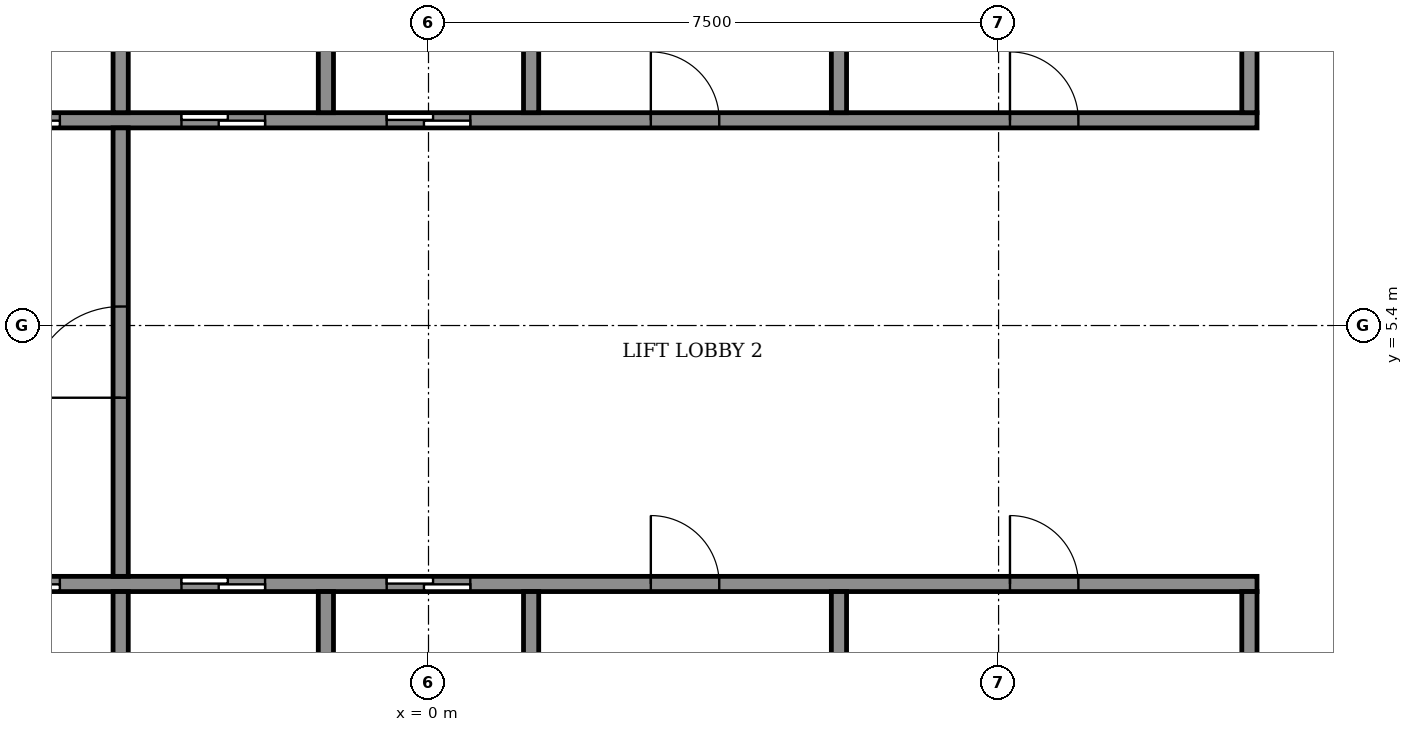
"""IFC4 building model, lengths in metres.
Left out: names, types, materials, properties, quantities, classifications, styles, units other than length and angle.
Written with IfcOpenShell. Run it as: python <this file> out.ifc"""

import sys

from ifc_helpers import new_model, si_unit, direction, frame, frame_2d, origin, place, context, subcontext, project, spatial, rectangle, extrude, element, fill, save


model = new_model("IFC4")
c1 = context("Model", 3, precision=1e-05, world=origin(), true_north=direction((0.0, 1.0)))
c2 = subcontext(c1, "Body", "Model", "MODEL_VIEW")
j1 = project(units=[si_unit("LENGTHUNIT", "METRE"), si_unit("PLANEANGLEUNIT", "RADIAN")], contexts=[c1])
p1 = place(None, origin())
s1 = spatial("IfcSite", under=j1, at=p1, CompositionType="ELEMENT")
p2 = place(p1, origin())
s2 = spatial("IfcBuilding", under=s1, at=p2, CompositionType="ELEMENT")
p3 = place(p2, frame((0.0, 0.0, 271.7)))
s3 = spatial("IfcBuildingStorey", under=s2, at=p3, CompositionType="ELEMENT", Elevation=271.7)
p4 = place(p3, frame((-10.9, 2.0, 0.0), z_axis=(0.0, 0.0, 1.0), x_axis=(1.0, 0.0, 0.0)))
e1 = element("IfcWall", 1, at=p4, inside=s3, PredefinedType="SHEAR", context=c2, shape_type="SweptSolid", body=[
    extrude(rectangle(XDim=21.8, YDim=0.2, at=frame_2d((10.9, 0.0))), origin(), (0.0, 0.0, 1.0), 3.05),
])
p5 = place(p4, frame((4.95, 0.0, 0.0)))
e2 = element("IfcOpeningElement", 2, at=p5, cuts=e1, PredefinedType="OPENING", context=c2, shape_type="SweptSolid", body=[
    extrude(rectangle(XDim=1.1, YDim=2.1, at=frame_2d((0.55, 1.05))), frame((0.0, 0.11, 0.0), z_axis=(0.0, -1.0, 0.0), x_axis=(1.0, 0.0, 0.0)), (0.0, 0.0, 1.0), 0.22),
])
p6 = place(p4, frame((7.65, 0.0, 0.0)))
e3 = element("IfcOpeningElement", 3, at=p6, cuts=e1, PredefinedType="OPENING", context=c2, shape_type="SweptSolid", body=[
    extrude(rectangle(XDim=1.1, YDim=2.1, at=frame_2d((0.55, 1.05))), frame((0.0, 0.11, 0.0), z_axis=(0.0, -1.0, 0.0), x_axis=(1.0, 0.0, 0.0)), (0.0, 0.0, 1.0), 0.22),
])
p7 = place(p4, frame((10.35, 0.0, 0.0)))
e4 = element("IfcOpeningElement", 4, at=p7, cuts=e1, PredefinedType="OPENING", context=c2, shape_type="SweptSolid", body=[
    extrude(rectangle(XDim=1.1, YDim=2.1, at=frame_2d((0.55, 1.05))), frame((0.0, 0.11, 0.0), z_axis=(0.0, -1.0, 0.0), x_axis=(1.0, 0.0, 0.0)), (0.0, 0.0, 1.0), 0.22),
])
p8 = place(p4, frame((1.675, 0.0, 0.0)))
e5 = element("IfcOpeningElement", 5, at=p8, cuts=e1, PredefinedType="OPENING", context=c2, shape_type="SweptSolid", body=[
    extrude(rectangle(XDim=0.9, YDim=2.1, at=frame_2d((0.45, 1.05))), frame((0.0, 0.11, 0.0), z_axis=(0.0, -1.0, 0.0), x_axis=(1.0, 0.0, 0.0)), (0.0, 0.0, 1.0), 0.22),
])
p9 = place(p4, frame((13.825, 0.0, 0.0)))
e6 = element("IfcOpeningElement", 6, at=p9, cuts=e1, PredefinedType="OPENING", context=c2, shape_type="SweptSolid", body=[
    extrude(rectangle(XDim=0.9, YDim=2.1, at=frame_2d((0.45, 1.05))), frame((0.0, 0.11, 0.0), z_axis=(0.0, -1.0, 0.0), x_axis=(1.0, 0.0, 0.0)), (0.0, 0.0, 1.0), 0.22),
])
p10 = place(p4, frame((18.55, 0.0, 0.0)))
e7 = element("IfcOpeningElement", 7, at=p10, cuts=e1, PredefinedType="OPENING", context=c2, shape_type="SweptSolid", body=[
    extrude(rectangle(XDim=0.9, YDim=2.1, at=frame_2d((0.45, 1.05))), frame((0.0, 0.11, 0.0), z_axis=(0.0, -1.0, 0.0), x_axis=(1.0, 0.0, 0.0)), (0.0, 0.0, 1.0), 0.22),
])
p11 = place(p3, frame((-10.9, 8.1, 0.0), z_axis=(0.0, 0.0, 1.0), x_axis=(1.0, 0.0, 0.0)))
e8 = element("IfcWall", 8, at=p11, inside=s3, PredefinedType="SHEAR", context=c2, shape_type="SweptSolid", body=[
    extrude(rectangle(XDim=21.8, YDim=0.2, at=frame_2d((10.9, 0.0))), origin(), (0.0, 0.0, 1.0), 3.05),
])
p12 = place(p11, frame((4.95, 0.0, 0.0)))
e9 = element("IfcOpeningElement", 9, at=p12, cuts=e8, PredefinedType="OPENING", context=c2, shape_type="SweptSolid", body=[
    extrude(rectangle(XDim=1.1, YDim=2.1, at=frame_2d((0.55, 1.05))), frame((0.0, 0.11, 0.0), z_axis=(0.0, -1.0, 0.0), x_axis=(1.0, 0.0, 0.0)), (0.0, 0.0, 1.0), 0.22),
])
p13 = place(p11, frame((7.65, 0.0, 0.0)))
e10 = element("IfcOpeningElement", 10, at=p13, cuts=e8, PredefinedType="OPENING", context=c2, shape_type="SweptSolid", body=[
    extrude(rectangle(XDim=1.1, YDim=2.1, at=frame_2d((0.55, 1.05))), frame((0.0, 0.11, 0.0), z_axis=(0.0, -1.0, 0.0), x_axis=(1.0, 0.0, 0.0)), (0.0, 0.0, 1.0), 0.22),
])
p14 = place(p11, frame((10.35, 0.0, 0.0)))
e11 = element("IfcOpeningElement", 11, at=p14, cuts=e8, PredefinedType="OPENING", context=c2, shape_type="SweptSolid", body=[
    extrude(rectangle(XDim=1.1, YDim=2.1, at=frame_2d((0.55, 1.05))), frame((0.0, 0.11, 0.0), z_axis=(0.0, -1.0, 0.0), x_axis=(1.0, 0.0, 0.0)), (0.0, 0.0, 1.0), 0.22),
])
p15 = place(p11, frame((1.675, 0.0, 0.0)))
e12 = element("IfcOpeningElement", 12, at=p15, cuts=e8, PredefinedType="OPENING", context=c2, shape_type="SweptSolid", body=[
    extrude(rectangle(XDim=0.9, YDim=2.1, at=frame_2d((0.45, 1.05))), frame((0.0, 0.11, 0.0), z_axis=(0.0, -1.0, 0.0), x_axis=(1.0, 0.0, 0.0)), (0.0, 0.0, 1.0), 0.22),
])
p16 = place(p11, frame((13.825, 0.0, 0.0)))
e13 = element("IfcOpeningElement", 13, at=p16, cuts=e8, PredefinedType="OPENING", context=c2, shape_type="SweptSolid", body=[
    extrude(rectangle(XDim=0.9, YDim=2.1, at=frame_2d((0.45, 1.05))), frame((0.0, 0.11, 0.0), z_axis=(0.0, -1.0, 0.0), x_axis=(1.0, 0.0, 0.0)), (0.0, 0.0, 1.0), 0.22),
])
p17 = place(p11, frame((18.55, 0.0, 0.0)))
e14 = element("IfcOpeningElement", 14, at=p17, cuts=e8, PredefinedType="OPENING", context=c2, shape_type="SweptSolid", body=[
    extrude(rectangle(XDim=0.9, YDim=2.1, at=frame_2d((0.45, 1.05))), frame((0.0, 0.11, 0.0), z_axis=(0.0, -1.0, 0.0), x_axis=(1.0, 0.0, 0.0)), (0.0, 0.0, 1.0), 0.22),
])
for number, where, z_axis, x_axis in (
    (15, (-4.05, -0.6, 0.0), (0.0, 0.0, 1.0), (0.0, 1.0, 0.0)),
    (16, (-1.35, -0.6, 0.0), (0.0, 0.0, 1.0), (0.0, 1.0, 0.0)),
    (17, (1.35, -0.6, 0.0), (0.0, 0.0, 1.0), (0.0, 1.0, 0.0)),
):
    element("IfcWall", number, at=place(p3, frame(where, z_axis=z_axis, x_axis=x_axis)), inside=s3, PredefinedType="SHEAR", context=c2, shape_type="SweptSolid", body=[
        extrude(rectangle(XDim=2.5, YDim=0.2, at=frame_2d((1.25, 0.0))), origin(), (0.0, 0.0, 1.0), 3.05),
    ])
for number, where, z_axis, x_axis in (
    (18, (5.4, -0.6, 0.0), (0.0, 0.0, 1.0), (0.0, 1.0, 0.0)),
    (19, (10.8, -0.6, 0.0), (0.0, 0.0, 1.0), (0.0, 1.0, 0.0)),
):
    element("IfcWall", number, at=place(p3, frame(where, z_axis=z_axis, x_axis=x_axis)), inside=s3, PredefinedType="STANDARD", context=c2, shape_type="SweptSolid", body=[
        extrude(rectangle(XDim=2.5, YDim=0.2, at=frame_2d((1.25, 0.0))), origin(), (0.0, 0.0, 1.0), 3.05),
    ])
for number, where, z_axis, x_axis in (
    (20, (-4.05, 8.2, 0.0), (0.0, 0.0, 1.0), (0.0, 1.0, 0.0)),
    (21, (-1.35, 8.2, 0.0), (0.0, 0.0, 1.0), (0.0, 1.0, 0.0)),
    (22, (1.35, 8.2, 0.0), (0.0, 0.0, 1.0), (0.0, 1.0, 0.0)),
):
    element("IfcWall", number, at=place(p3, frame(where, z_axis=z_axis, x_axis=x_axis)), inside=s3, PredefinedType="SHEAR", context=c2, shape_type="SweptSolid", body=[
        extrude(rectangle(XDim=2.6, YDim=0.2, at=frame_2d((1.3, 0.0))), origin(), (0.0, 0.0, 1.0), 3.05),
    ])
for number, where, z_axis, x_axis in (
    (23, (5.4, 8.2, 0.0), (0.0, 0.0, 1.0), (0.0, 1.0, 0.0)),
    (24, (10.8, 8.2, 0.0), (0.0, 0.0, 1.0), (0.0, 1.0, 0.0)),
):
    element("IfcWall", number, at=place(p3, frame(where, z_axis=z_axis, x_axis=x_axis)), inside=s3, PredefinedType="STANDARD", context=c2, shape_type="SweptSolid", body=[
        extrude(rectangle(XDim=2.6, YDim=0.2, at=frame_2d((1.3, 0.0))), origin(), (0.0, 0.0, 1.0), 3.05),
    ])
p18 = place(p3, frame((-4.05, 2.1, 0.0), z_axis=(0.0, 0.0, 1.0), x_axis=(0.0, 1.0, 0.0)))
e25 = element("IfcWall", 25, at=p18, inside=s3, PredefinedType="STANDARD", context=c2, shape_type="SweptSolid", body=[
    extrude(rectangle(XDim=5.9, YDim=0.2, at=frame_2d((2.95, 0.0))), origin(), (0.0, 0.0, 1.0), 3.05),
])
p19 = place(p18, frame((2.35, 0.0, 0.0)))
e26 = element("IfcOpeningElement", 26, at=p19, cuts=e25, PredefinedType="OPENING", context=c2, shape_type="SweptSolid", body=[
    extrude(rectangle(XDim=1.2, YDim=2.1, at=frame_2d((0.6, 1.05))), frame((0.0, 0.11, 0.0), z_axis=(0.0, -1.0, 0.0), x_axis=(1.0, 0.0, 0.0)), (0.0, 0.0, 1.0), 0.22),
])
p20 = place(p5, origin())
e27 = element("IfcDoor", 27, at=p20, inside=s3, OperationType="SLIDING_TO_LEFT", PredefinedType="DOOR", context=c2, shape_type="SweptSolid", body=[
    extrude(rectangle(XDim=1.1, YDim=2.1, at=frame_2d((0.55, 1.05))), frame((0.0, 0.025, 0.0), z_axis=(0.0, -1.0, 0.0), x_axis=(1.0, 0.0, 0.0)), (0.0, 0.0, 1.0), 0.05),
])
fill(e2, e27)
p21 = place(p6, origin())
e28 = element("IfcDoor", 28, at=p21, inside=s3, OperationType="SLIDING_TO_LEFT", PredefinedType="DOOR", context=c2, shape_type="SweptSolid", body=[
    extrude(rectangle(XDim=1.1, YDim=2.1, at=frame_2d((0.55, 1.05))), frame((0.0, 0.025, 0.0), z_axis=(0.0, -1.0, 0.0), x_axis=(1.0, 0.0, 0.0)), (0.0, 0.0, 1.0), 0.05),
])
fill(e3, e28)
p22 = place(p7, origin())
e29 = element("IfcDoor", 29, at=p22, inside=s3, OperationType="SLIDING_TO_LEFT", PredefinedType="DOOR", context=c2, shape_type="SweptSolid", body=[
    extrude(rectangle(XDim=1.1, YDim=2.1, at=frame_2d((0.55, 1.05))), frame((0.0, 0.025, 0.0), z_axis=(0.0, -1.0, 0.0), x_axis=(1.0, 0.0, 0.0)), (0.0, 0.0, 1.0), 0.05),
])
fill(e4, e29)
p23 = place(p12, origin())
e30 = element("IfcDoor", 30, at=p23, inside=s3, OperationType="SLIDING_TO_LEFT", PredefinedType="DOOR", context=c2, shape_type="SweptSolid", body=[
    extrude(rectangle(XDim=1.1, YDim=2.1, at=frame_2d((0.55, 1.05))), frame((0.0, 0.025, 0.0), z_axis=(0.0, -1.0, 0.0), x_axis=(1.0, 0.0, 0.0)), (0.0, 0.0, 1.0), 0.05),
])
fill(e9, e30)
p24 = place(p13, origin())
e31 = element("IfcDoor", 31, at=p24, inside=s3, OperationType="SLIDING_TO_LEFT", PredefinedType="DOOR", context=c2, shape_type="SweptSolid", body=[
    extrude(rectangle(XDim=1.1, YDim=2.1, at=frame_2d((0.55, 1.05))), frame((0.0, 0.025, 0.0), z_axis=(0.0, -1.0, 0.0), x_axis=(1.0, 0.0, 0.0)), (0.0, 0.0, 1.0), 0.05),
])
fill(e10, e31)
p25 = place(p14, origin())
e32 = element("IfcDoor", 32, at=p25, inside=s3, OperationType="SLIDING_TO_LEFT", PredefinedType="DOOR", context=c2, shape_type="SweptSolid", body=[
    extrude(rectangle(XDim=1.1, YDim=2.1, at=frame_2d((0.55, 1.05))), frame((0.0, 0.025, 0.0), z_axis=(0.0, -1.0, 0.0), x_axis=(1.0, 0.0, 0.0)), (0.0, 0.0, 1.0), 0.05),
])
fill(e11, e32)
p26 = place(p9, origin())
e33 = element("IfcDoor", 33, at=p26, inside=s3, OperationType="SINGLE_SWING_LEFT", PredefinedType="DOOR", context=c2, shape_type="SweptSolid", body=[
    extrude(rectangle(XDim=0.9, YDim=2.1, at=frame_2d((0.45, 1.05))), frame((0.0, 0.025, 0.0), z_axis=(0.0, -1.0, 0.0), x_axis=(1.0, 0.0, 0.0)), (0.0, 0.0, 1.0), 0.05),
])
fill(e6, e33)
p27 = place(p10, origin())
e34 = element("IfcDoor", 34, at=p27, inside=s3, OperationType="SINGLE_SWING_RIGHT", PredefinedType="DOOR", context=c2, shape_type="SweptSolid", body=[
    extrude(rectangle(XDim=0.9, YDim=2.1, at=frame_2d((0.45, 1.05))), frame((0.0, 0.025, 0.0), z_axis=(0.0, -1.0, 0.0), x_axis=(1.0, 0.0, 0.0)), (0.0, 0.0, 1.0), 0.05),
])
fill(e7, e34)
p28 = place(p16, origin())
e35 = element("IfcDoor", 35, at=p28, inside=s3, OperationType="SINGLE_SWING_LEFT", PredefinedType="DOOR", context=c2, shape_type="SweptSolid", body=[
    extrude(rectangle(XDim=0.9, YDim=2.1, at=frame_2d((0.45, 1.05))), frame((0.0, 0.025, 0.0), z_axis=(0.0, -1.0, 0.0), x_axis=(1.0, 0.0, 0.0)), (0.0, 0.0, 1.0), 0.05),
])
fill(e13, e35)
p29 = place(p17, origin())
e36 = element("IfcDoor", 36, at=p29, inside=s3, OperationType="SINGLE_SWING_RIGHT", PredefinedType="DOOR", context=c2, shape_type="SweptSolid", body=[
    extrude(rectangle(XDim=0.9, YDim=2.1, at=frame_2d((0.45, 1.05))), frame((0.0, 0.025, 0.0), z_axis=(0.0, -1.0, 0.0), x_axis=(1.0, 0.0, 0.0)), (0.0, 0.0, 1.0), 0.05),
])
fill(e14, e36)
p30 = place(p19, origin())
e37 = element("IfcDoor", 37, at=p30, inside=s3, OperationType="SINGLE_SWING_LEFT", PredefinedType="DOOR", context=c2, shape_type="SweptSolid", body=[
    extrude(rectangle(XDim=1.2, YDim=2.1, at=frame_2d((0.6, 1.05))), frame((0.0, 0.025, 0.0), z_axis=(0.0, -1.0, 0.0), x_axis=(1.0, 0.0, 0.0)), (0.0, 0.0, 1.0), 0.05),
])
fill(e26, e37)
save(model, sys.argv[1])
